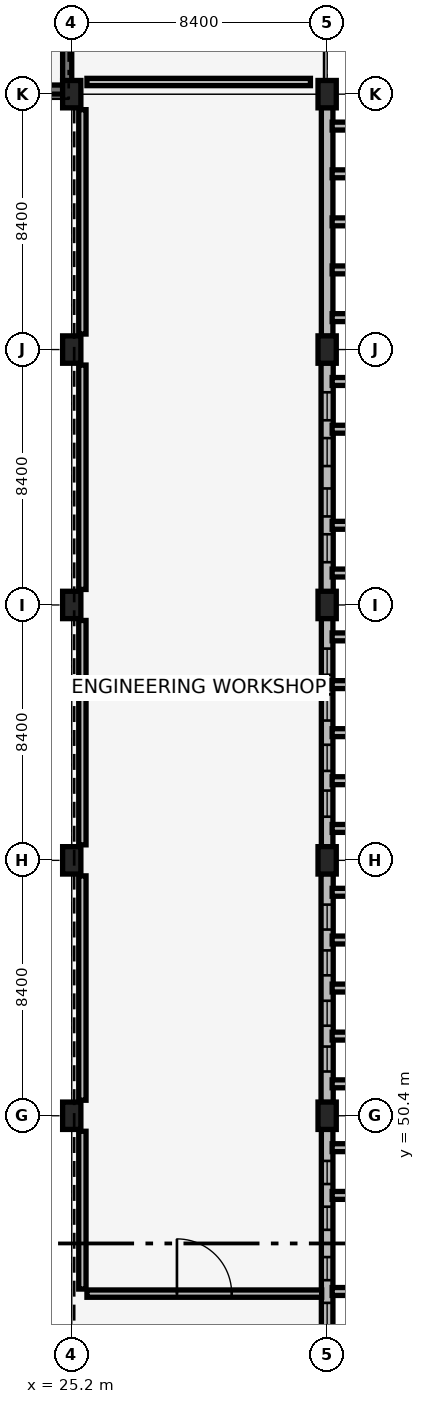
"""IFC4 building model, lengths in metres.
Left out: names, types, materials, properties, quantities, classifications, styles, units other than length and angle.
Written with IfcOpenShell. Run it as: python <this file> out.ifc"""

import sys

from ifc_helpers import new_model, si_unit, direction, frame, frame_2d, origin, origin_2d, place, context, subcontext, project, spatial, rectangle, extrude, element, fill, save


model = new_model("IFC4")
c1 = context("Model", 3, precision=1e-05, world=origin(), true_north=direction((0.0, 1.0)))
c2 = subcontext(c1, "Body", "Model", "MODEL_VIEW")
j1 = project(units=[si_unit("LENGTHUNIT", "METRE"), si_unit("PLANEANGLEUNIT", "RADIAN")], contexts=[c1])
p1 = place(None, origin())
s1 = spatial("IfcSite", under=j1, at=p1, CompositionType="ELEMENT")
p2 = place(p1, origin())
s2 = spatial("IfcBuilding", under=s1, at=p2, CompositionType="ELEMENT")
p3 = place(p2, frame((0.0, 0.0, 5.44)))
s3 = spatial("IfcBuildingStorey", under=s2, at=p3, CompositionType="ELEMENT", Elevation=5.44)
p4 = place(p3, frame((16.95, 84.15, 0.0), z_axis=(0.0, 0.0, 1.0), x_axis=(1.0, 0.0, 0.0)))
e1 = element("IfcWall", 1, at=p4, inside=s3, PredefinedType="SHEAR", context=c2, shape_type="SweptSolid", body=[
    extrude(rectangle(XDim=8.1, YDim=0.3, at=frame_2d((4.05, 0.0))), origin(), (0.0, 0.0, 1.0), 4.12),
])
p5 = place(p3, frame((25.05, 84.15, 0.0), z_axis=(0.0, 0.0, 1.0), x_axis=(0.0, 1.0, 0.0)))
e2 = element("IfcWall", 2, at=p5, inside=s3, PredefinedType="SHEAR", context=c2, shape_type="SweptSolid", body=[
    extrude(rectangle(XDim=8.1, YDim=0.3, at=frame_2d((4.05, 0.0))), origin(), (0.0, 0.0, 1.0), 4.12),
])
p6 = place(p5, frame((1.325, 0.0, 0.0)))
e3 = element("IfcOpeningElement", 3, at=p6, cuts=e2, PredefinedType="OPENING", context=c2, shape_type="SweptSolid", body=[
    extrude(rectangle(XDim=1.45, YDim=2.15, at=frame_2d((0.725, 1.075))), frame((0.0, 0.16, 0.0), z_axis=(0.0, -1.0, 0.0), x_axis=(1.0, 0.0, 0.0)), (0.0, 0.0, 1.0), 0.32),
])
for number, where, z_axis, x_axis in (
    (4, (25.2, 50.4, 0.0), (0.0, 0.0, 1.0), (1.0, 0.0, 0.0)),
    (5, (25.2, 58.8, 0.0), (0.0, 0.0, 1.0), (1.0, 0.0, 0.0)),
    (6, (25.2, 67.2, 0.0), (0.0, 0.0, 1.0), (1.0, 0.0, 0.0)),
    (7, (25.2, 75.6, 0.0), (0.0, 0.0, 1.0), (1.0, 0.0, 0.0)),
    (8, (25.2, 84.0, 0.0), (0.0, 0.0, 1.0), (1.0, 0.0, 0.0)),
    (9, (33.6, 50.4, 0.0), (0.0, 0.0, 1.0), (1.0, 0.0, 0.0)),
    (10, (33.6, 58.8, 0.0), (0.0, 0.0, 1.0), (1.0, 0.0, 0.0)),
    (11, (33.6, 67.2, 0.0), (0.0, 0.0, 1.0), (1.0, 0.0, 0.0)),
    (12, (33.6, 75.6, 0.0), (0.0, 0.0, 1.0), (1.0, 0.0, 0.0)),
    (13, (33.6, 84.0, 0.0), (0.0, 0.0, 1.0), (1.0, 0.0, 0.0)),
):
    element("IfcColumn", number, at=place(p3, frame(where, z_axis=z_axis, x_axis=x_axis)), inside=s3, PredefinedType="COLUMN", context=c2, shape_type="SweptSolid", body=[
        extrude(rectangle(XDim=0.6, YDim=0.9, at=origin_2d()), origin(), (0.0, 0.0, 1.0), 4.12),
    ])
p7 = place(p3, frame((33.6, 42.435, 0.0), z_axis=(0.0, 0.0, 1.0), x_axis=(0.0, 1.0, 0.0)))
e14 = element("IfcWall", 14, at=p7, inside=s3, PredefinedType="SOLIDWALL", context=c2, shape_type="SweptSolid", body=[
    extrude(rectangle(XDim=7.53, YDim=0.38, at=frame_2d((3.765, 0.0))), origin(), (0.0, 0.0, 1.0), 4.02),
])
p8 = place(p7, frame((1.051, 0.0, 0.75)))
e15 = element("IfcOpeningElement", 15, at=p8, cuts=e14, PredefinedType="OPENING", context=c2, shape_type="SweptSolid", body=[
    extrude(rectangle(XDim=0.76, YDim=2.45, at=frame_2d((0.38, 1.225))), frame((0.0, 0.2, 0.0), z_axis=(0.0, -1.0, 0.0), x_axis=(1.0, 0.0, 0.0)), (0.0, 0.0, 1.0), 0.4),
])
p9 = place(p7, frame((2.557, 0.0, 0.75)))
e16 = element("IfcOpeningElement", 16, at=p9, cuts=e14, PredefinedType="OPENING", context=c2, shape_type="SweptSolid", body=[
    extrude(rectangle(XDim=0.76, YDim=2.45, at=frame_2d((0.38, 1.225))), frame((0.0, 0.2, 0.0), z_axis=(0.0, -1.0, 0.0), x_axis=(1.0, 0.0, 0.0)), (0.0, 0.0, 1.0), 0.4),
])
p10 = place(p7, frame((4.213, 0.0, 0.75)))
e17 = element("IfcOpeningElement", 17, at=p10, cuts=e14, PredefinedType="OPENING", context=c2, shape_type="SweptSolid", body=[
    extrude(rectangle(XDim=0.76, YDim=2.45, at=frame_2d((0.38, 1.225))), frame((0.0, 0.2, 0.0), z_axis=(0.0, -1.0, 0.0), x_axis=(1.0, 0.0, 0.0)), (0.0, 0.0, 1.0), 0.4),
])
p11 = place(p7, frame((5.719, 0.0, 0.75)))
e18 = element("IfcOpeningElement", 18, at=p11, cuts=e14, PredefinedType="OPENING", context=c2, shape_type="SweptSolid", body=[
    extrude(rectangle(XDim=0.76, YDim=2.45, at=frame_2d((0.38, 1.225))), frame((0.0, 0.2, 0.0), z_axis=(0.0, -1.0, 0.0), x_axis=(1.0, 0.0, 0.0)), (0.0, 0.0, 1.0), 0.4),
])
for number, where, z_axis, x_axis in (
    (19, (33.765, 44.62, 0.0), (0.0, 0.0, 1.0), (1.0, 0.0, 0.0)),
    (20, (33.765, 47.78, 0.0), (0.0, 0.0, 1.0), (1.0, 0.0, 0.0)),
    (21, (33.765, 49.35, 0.0), (0.0, 0.0, 1.0), (1.0, 0.0, 0.0)),
):
    element("IfcWall", number, at=place(p3, frame(where, z_axis=z_axis, x_axis=x_axis)), inside=s3, PredefinedType="SOLIDWALL", context=c2, shape_type="SweptSolid", body=[
        extrude(rectangle(XDim=0.7, YDim=0.26, at=frame_2d((0.35, 0.0))), origin(), (0.0, 0.0, 1.0), 4.42),
    ])
p12 = place(p3, frame((33.6, 50.835, 0.0), z_axis=(0.0, 0.0, 1.0), x_axis=(0.0, 1.0, 0.0)))
e22 = element("IfcWall", 22, at=p12, inside=s3, PredefinedType="SOLIDWALL", context=c2, shape_type="SweptSolid", body=[
    extrude(rectangle(XDim=7.53, YDim=0.4, at=frame_2d((3.765, 0.0))), origin(), (0.0, 0.0, 1.0), 4.02),
])
p13 = place(p12, frame((1.021, 0.0, 0.75)))
e23 = element("IfcOpeningElement", 23, at=p13, cuts=e22, PredefinedType="OPENING", context=c2, shape_type="SweptSolid", body=[
    extrude(rectangle(XDim=0.82, YDim=2.8, at=frame_2d((0.41, 1.4))), frame((0.0, 0.21, 0.0), z_axis=(0.0, -1.0, 0.0), x_axis=(1.0, 0.0, 0.0)), (0.0, 0.0, 1.0), 0.42),
])
p14 = place(p12, frame((2.527, 0.0, 0.75)))
e24 = element("IfcOpeningElement", 24, at=p14, cuts=e22, PredefinedType="OPENING", context=c2, shape_type="SweptSolid", body=[
    extrude(rectangle(XDim=0.82, YDim=2.8, at=frame_2d((0.41, 1.4))), frame((0.0, 0.21, 0.0), z_axis=(0.0, -1.0, 0.0), x_axis=(1.0, 0.0, 0.0)), (0.0, 0.0, 1.0), 0.42),
])
p15 = place(p12, frame((4.183, 0.0, 0.75)))
e25 = element("IfcOpeningElement", 25, at=p15, cuts=e22, PredefinedType="OPENING", context=c2, shape_type="SweptSolid", body=[
    extrude(rectangle(XDim=0.82, YDim=2.8, at=frame_2d((0.41, 1.4))), frame((0.0, 0.21, 0.0), z_axis=(0.0, -1.0, 0.0), x_axis=(1.0, 0.0, 0.0)), (0.0, 0.0, 1.0), 0.42),
])
p16 = place(p12, frame((5.689, 0.0, 0.75)))
e26 = element("IfcOpeningElement", 26, at=p16, cuts=e22, PredefinedType="OPENING", context=c2, shape_type="SweptSolid", body=[
    extrude(rectangle(XDim=0.82, YDim=2.8, at=frame_2d((0.41, 1.4))), frame((0.0, 0.21, 0.0), z_axis=(0.0, -1.0, 0.0), x_axis=(1.0, 0.0, 0.0)), (0.0, 0.0, 1.0), 0.42),
])
for number, where, z_axis, x_axis in (
    (27, (33.765, 51.45, 0.0), (0.0, 0.0, 1.0), (1.0, 0.0, 0.0)),
    (28, (33.765, 53.02, 0.0), (0.0, 0.0, 1.0), (1.0, 0.0, 0.0)),
    (29, (33.765, 54.6, 0.0), (0.0, 0.0, 1.0), (1.0, 0.0, 0.0)),
    (30, (33.765, 56.18, 0.0), (0.0, 0.0, 1.0), (1.0, 0.0, 0.0)),
    (31, (33.765, 57.75, 0.0), (0.0, 0.0, 1.0), (1.0, 0.0, 0.0)),
):
    element("IfcWall", number, at=place(p3, frame(where, z_axis=z_axis, x_axis=x_axis)), inside=s3, PredefinedType="SOLIDWALL", context=c2, shape_type="SweptSolid", body=[
        extrude(rectangle(XDim=0.7, YDim=0.26, at=frame_2d((0.35, 0.0))), origin(), (0.0, 0.0, 1.0), 4.42),
    ])
p17 = place(p3, frame((33.6, 59.235, 0.0), z_axis=(0.0, 0.0, 1.0), x_axis=(0.0, 1.0, 0.0)))
e32 = element("IfcWall", 32, at=p17, inside=s3, PredefinedType="SOLIDWALL", context=c2, shape_type="SweptSolid", body=[
    extrude(rectangle(XDim=7.53, YDim=0.38, at=frame_2d((3.765, 0.0))), origin(), (0.0, 0.0, 1.0), 4.02),
])
p18 = place(p17, frame((1.001, 0.0, 0.75)))
e33 = element("IfcOpeningElement", 33, at=p18, cuts=e32, PredefinedType="OPENING", context=c2, shape_type="SweptSolid", body=[
    extrude(rectangle(XDim=0.86, YDim=2.6, at=frame_2d((0.43, 1.3))), frame((0.0, 0.2, 0.0), z_axis=(0.0, -1.0, 0.0), x_axis=(1.0, 0.0, 0.0)), (0.0, 0.0, 1.0), 0.4),
])
p19 = place(p17, frame((2.507, 0.0, 0.75)))
e34 = element("IfcOpeningElement", 34, at=p19, cuts=e32, PredefinedType="OPENING", context=c2, shape_type="SweptSolid", body=[
    extrude(rectangle(XDim=0.86, YDim=2.6, at=frame_2d((0.43, 1.3))), frame((0.0, 0.2, 0.0), z_axis=(0.0, -1.0, 0.0), x_axis=(1.0, 0.0, 0.0)), (0.0, 0.0, 1.0), 0.4),
])
p20 = place(p17, frame((4.163, 0.0, 0.75)))
e35 = element("IfcOpeningElement", 35, at=p20, cuts=e32, PredefinedType="OPENING", context=c2, shape_type="SweptSolid", body=[
    extrude(rectangle(XDim=0.86, YDim=2.6, at=frame_2d((0.43, 1.3))), frame((0.0, 0.2, 0.0), z_axis=(0.0, -1.0, 0.0), x_axis=(1.0, 0.0, 0.0)), (0.0, 0.0, 1.0), 0.4),
])
p21 = place(p17, frame((5.669, 0.0, 0.75)))
e36 = element("IfcOpeningElement", 36, at=p21, cuts=e32, PredefinedType="OPENING", context=c2, shape_type="SweptSolid", body=[
    extrude(rectangle(XDim=0.86, YDim=2.6, at=frame_2d((0.43, 1.3))), frame((0.0, 0.2, 0.0), z_axis=(0.0, -1.0, 0.0), x_axis=(1.0, 0.0, 0.0)), (0.0, 0.0, 1.0), 0.4),
])
for number, where, z_axis, x_axis in (
    (37, (33.765, 59.85, 0.0), (0.0, 0.0, 1.0), (1.0, 0.0, 0.0)),
    (38, (33.765, 61.42, 0.0), (0.0, 0.0, 1.0), (1.0, 0.0, 0.0)),
    (39, (33.765, 63.0, 0.0), (0.0, 0.0, 1.0), (1.0, 0.0, 0.0)),
    (40, (33.765, 64.58, 0.0), (0.0, 0.0, 1.0), (1.0, 0.0, 0.0)),
    (41, (33.765, 66.15, 0.0), (0.0, 0.0, 1.0), (1.0, 0.0, 0.0)),
):
    element("IfcWall", number, at=place(p3, frame(where, z_axis=z_axis, x_axis=x_axis)), inside=s3, PredefinedType="SOLIDWALL", context=c2, shape_type="SweptSolid", body=[
        extrude(rectangle(XDim=0.7, YDim=0.26, at=frame_2d((0.35, 0.0))), origin(), (0.0, 0.0, 1.0), 4.42),
    ])
p22 = place(p3, frame((33.6, 67.635, 0.0), z_axis=(0.0, 0.0, 1.0), x_axis=(0.0, 1.0, 0.0)))
e42 = element("IfcWall", 42, at=p22, inside=s3, PredefinedType="SOLIDWALL", context=c2, shape_type="SweptSolid", body=[
    extrude(rectangle(XDim=7.53, YDim=0.4, at=frame_2d((3.765, 0.0))), origin(), (0.0, 0.0, 1.0), 4.02),
])
p23 = place(p22, frame((0.971, 0.0, 0.75)))
e43 = element("IfcOpeningElement", 43, at=p23, cuts=e42, PredefinedType="OPENING", context=c2, shape_type="SweptSolid", body=[
    extrude(rectangle(XDim=0.92, YDim=2.85, at=frame_2d((0.46, 1.425))), frame((0.0, 0.21, 0.0), z_axis=(0.0, -1.0, 0.0), x_axis=(1.0, 0.0, 0.0)), (0.0, 0.0, 1.0), 0.42),
])
p24 = place(p22, frame((2.477, 0.0, 0.75)))
e44 = element("IfcOpeningElement", 44, at=p24, cuts=e42, PredefinedType="OPENING", context=c2, shape_type="SweptSolid", body=[
    extrude(rectangle(XDim=0.92, YDim=2.85, at=frame_2d((0.46, 1.425))), frame((0.0, 0.21, 0.0), z_axis=(0.0, -1.0, 0.0), x_axis=(1.0, 0.0, 0.0)), (0.0, 0.0, 1.0), 0.42),
])
p25 = place(p22, frame((4.133, 0.0, 0.75)))
e45 = element("IfcOpeningElement", 45, at=p25, cuts=e42, PredefinedType="OPENING", context=c2, shape_type="SweptSolid", body=[
    extrude(rectangle(XDim=0.92, YDim=2.85, at=frame_2d((0.46, 1.425))), frame((0.0, 0.21, 0.0), z_axis=(0.0, -1.0, 0.0), x_axis=(1.0, 0.0, 0.0)), (0.0, 0.0, 1.0), 0.42),
])
p26 = place(p22, frame((5.639, 0.0, 0.75)))
e46 = element("IfcOpeningElement", 46, at=p26, cuts=e42, PredefinedType="OPENING", context=c2, shape_type="SweptSolid", body=[
    extrude(rectangle(XDim=0.92, YDim=2.85, at=frame_2d((0.46, 1.425))), frame((0.0, 0.21, 0.0), z_axis=(0.0, -1.0, 0.0), x_axis=(1.0, 0.0, 0.0)), (0.0, 0.0, 1.0), 0.42),
])
for number, where, z_axis, x_axis in (
    (47, (33.765, 68.25, 0.0), (0.0, 0.0, 1.0), (1.0, 0.0, 0.0)),
    (48, (33.765, 69.82, 0.0), (0.0, 0.0, 1.0), (1.0, 0.0, 0.0)),
    (49, (33.765, 72.98, 0.0), (0.0, 0.0, 1.0), (1.0, 0.0, 0.0)),
    (50, (33.765, 74.55, 0.0), (0.0, 0.0, 1.0), (1.0, 0.0, 0.0)),
):
    element("IfcWall", number, at=place(p3, frame(where, z_axis=z_axis, x_axis=x_axis)), inside=s3, PredefinedType="SOLIDWALL", context=c2, shape_type="SweptSolid", body=[
        extrude(rectangle(XDim=0.7, YDim=0.26, at=frame_2d((0.35, 0.0))), origin(), (0.0, 0.0, 1.0), 4.42),
    ])
p27 = place(p3, frame((33.6, 76.035, 0.0), z_axis=(0.0, 0.0, 1.0), x_axis=(0.0, 1.0, 0.0)))
e51 = element("IfcWall", 51, at=p27, inside=s3, PredefinedType="SOLIDWALL", context=c2, shape_type="SweptSolid", body=[
    extrude(rectangle(XDim=7.53, YDim=0.38, at=frame_2d((3.765, 0.0))), origin(), (0.0, 0.0, 1.0), 4.02),
])
for number, where, z_axis, x_axis in (
    (52, (33.765, 76.65, 0.0), (0.0, 0.0, 1.0), (1.0, 0.0, 0.0)),
    (53, (33.765, 78.22, 0.0), (0.0, 0.0, 1.0), (1.0, 0.0, 0.0)),
    (54, (33.765, 79.8, 0.0), (0.0, 0.0, 1.0), (1.0, 0.0, 0.0)),
    (55, (33.765, 81.38, 0.0), (0.0, 0.0, 1.0), (1.0, 0.0, 0.0)),
    (56, (33.765, 82.95, 0.0), (0.0, 0.0, 1.0), (1.0, 0.0, 0.0)),
):
    element("IfcWall", number, at=place(p3, frame(where, z_axis=z_axis, x_axis=x_axis)), inside=s3, PredefinedType="SOLIDWALL", context=c2, shape_type="SweptSolid", body=[
        extrude(rectangle(XDim=0.7, YDim=0.26, at=frame_2d((0.35, 0.0))), origin(), (0.0, 0.0, 1.0), 4.42),
    ])
p28 = place(p3, frame((25.7, 44.55, 0.0), z_axis=(0.0, 0.0, 1.0), x_axis=(1.0, 0.0, 0.0)))
e57 = element("IfcWall", 57, at=p28, inside=s3, PredefinedType="PARTITIONING", context=c2, shape_type="SweptSolid", body=[
    extrude(rectangle(XDim=7.72, YDim=0.24, at=frame_2d((3.86, 0.0))), origin(), (0.0, 0.0, 1.0), 4.02),
])
p29 = place(p28, frame((2.96, 0.0, 0.0)))
e58 = element("IfcOpeningElement", 58, at=p29, cuts=e57, PredefinedType="OPENING", context=c2, shape_type="SweptSolid", body=[
    extrude(rectangle(XDim=1.8, YDim=2.4, at=frame_2d((0.9, 1.2))), frame((0.0, 0.13, 0.0), z_axis=(0.0, -1.0, 0.0), x_axis=(1.0, 0.0, 0.0)), (0.0, 0.0, 1.0), 0.26),
])
p30 = place(p3, frame((25.7, 84.4, 0.0), z_axis=(0.0, 0.0, 1.0), x_axis=(1.0, 0.0, 0.0)))
e59 = element("IfcWall", 59, at=p30, inside=s3, PredefinedType="PARTITIONING", context=c2, shape_type="SweptSolid", body=[
    extrude(rectangle(XDim=7.35, YDim=0.24, at=frame_2d((3.675, 0.0))), origin(), (0.0, 0.0, 1.0), 4.12),
])
p31 = place(p3, frame((25.55, 44.7, 0.0), z_axis=(0.0, 0.0, 1.0), x_axis=(0.0, 1.0, 0.0)))
e60 = element("IfcWall", 60, at=p31, inside=s3, PredefinedType="PARTITIONING", context=c2, shape_type="SweptSolid", body=[
    extrude(rectangle(XDim=5.19, YDim=0.24, at=frame_2d((2.595, 0.0))), origin(), (0.0, 0.0, 1.0), 4.12),
])
p32 = place(p3, frame((25.55, 50.91, 0.0), z_axis=(0.0, 0.0, 1.0), x_axis=(0.0, 1.0, 0.0)))
e61 = element("IfcWall", 61, at=p32, inside=s3, PredefinedType="PARTITIONING", context=c2, shape_type="SweptSolid", body=[
    extrude(rectangle(XDim=7.38, YDim=0.24, at=frame_2d((3.69, 0.0))), origin(), (0.0, 0.0, 1.0), 4.12),
])
p33 = place(p3, frame((25.55, 59.31, 0.0), z_axis=(0.0, 0.0, 1.0), x_axis=(0.0, 1.0, 0.0)))
e62 = element("IfcWall", 62, at=p33, inside=s3, PredefinedType="PARTITIONING", context=c2, shape_type="SweptSolid", body=[
    extrude(rectangle(XDim=7.38, YDim=0.24, at=frame_2d((3.69, 0.0))), origin(), (0.0, 0.0, 1.0), 4.12),
])
p34 = place(p3, frame((25.55, 67.71, 0.0), z_axis=(0.0, 0.0, 1.0), x_axis=(0.0, 1.0, 0.0)))
e63 = element("IfcWall", 63, at=p34, inside=s3, PredefinedType="PARTITIONING", context=c2, shape_type="SweptSolid", body=[
    extrude(rectangle(XDim=7.38, YDim=0.24, at=frame_2d((3.69, 0.0))), origin(), (0.0, 0.0, 1.0), 4.12),
])
p35 = place(p3, frame((25.55, 76.11, 0.0), z_axis=(0.0, 0.0, 1.0), x_axis=(0.0, 1.0, 0.0)))
e64 = element("IfcWall", 64, at=p35, inside=s3, PredefinedType="PARTITIONING", context=c2, shape_type="SweptSolid", body=[
    extrude(rectangle(XDim=7.38, YDim=0.24, at=frame_2d((3.69, 0.0))), origin(), (0.0, 0.0, 1.0), 4.12),
])
p36 = place(p8, origin())
e65 = element("IfcWindow", 65, at=p36, inside=s3, PartitioningType="DOUBLE_PANEL_VERTICAL", PredefinedType="WINDOW", context=c2, shape_type="SweptSolid", body=[
    extrude(rectangle(XDim=0.76, YDim=2.45, at=frame_2d((0.38, 1.225))), frame((0.0, 0.03, 0.0), z_axis=(0.0, -1.0, 0.0), x_axis=(1.0, 0.0, 0.0)), (0.0, 0.0, 1.0), 0.06),
])
fill(e15, e65)
p37 = place(p9, origin())
e66 = element("IfcWindow", 66, at=p37, inside=s3, PartitioningType="DOUBLE_PANEL_VERTICAL", PredefinedType="WINDOW", context=c2, shape_type="SweptSolid", body=[
    extrude(rectangle(XDim=0.76, YDim=2.45, at=frame_2d((0.38, 1.225))), frame((0.0, 0.03, 0.0), z_axis=(0.0, -1.0, 0.0), x_axis=(1.0, 0.0, 0.0)), (0.0, 0.0, 1.0), 0.06),
])
fill(e16, e66)
p38 = place(p10, origin())
e67 = element("IfcWindow", 67, at=p38, inside=s3, PartitioningType="DOUBLE_PANEL_VERTICAL", PredefinedType="WINDOW", context=c2, shape_type="SweptSolid", body=[
    extrude(rectangle(XDim=0.76, YDim=2.45, at=frame_2d((0.38, 1.225))), frame((0.0, 0.03, 0.0), z_axis=(0.0, -1.0, 0.0), x_axis=(1.0, 0.0, 0.0)), (0.0, 0.0, 1.0), 0.06),
])
fill(e17, e67)
p39 = place(p11, origin())
e68 = element("IfcWindow", 68, at=p39, inside=s3, PartitioningType="DOUBLE_PANEL_VERTICAL", PredefinedType="WINDOW", context=c2, shape_type="SweptSolid", body=[
    extrude(rectangle(XDim=0.76, YDim=2.45, at=frame_2d((0.38, 1.225))), frame((0.0, 0.03, 0.0), z_axis=(0.0, -1.0, 0.0), x_axis=(1.0, 0.0, 0.0)), (0.0, 0.0, 1.0), 0.06),
])
fill(e18, e68)
p40 = place(p13, origin())
e69 = element("IfcWindow", 69, at=p40, inside=s3, PartitioningType="DOUBLE_PANEL_VERTICAL", PredefinedType="WINDOW", context=c2, shape_type="SweptSolid", body=[
    extrude(rectangle(XDim=0.82, YDim=2.8, at=frame_2d((0.41, 1.4))), frame((0.0, 0.03, 0.0), z_axis=(0.0, -1.0, 0.0), x_axis=(1.0, 0.0, 0.0)), (0.0, 0.0, 1.0), 0.06),
])
fill(e23, e69)
p41 = place(p14, origin())
e70 = element("IfcWindow", 70, at=p41, inside=s3, PartitioningType="DOUBLE_PANEL_VERTICAL", PredefinedType="WINDOW", context=c2, shape_type="SweptSolid", body=[
    extrude(rectangle(XDim=0.82, YDim=2.8, at=frame_2d((0.41, 1.4))), frame((0.0, 0.03, 0.0), z_axis=(0.0, -1.0, 0.0), x_axis=(1.0, 0.0, 0.0)), (0.0, 0.0, 1.0), 0.06),
])
fill(e24, e70)
p42 = place(p15, origin())
e71 = element("IfcWindow", 71, at=p42, inside=s3, PartitioningType="DOUBLE_PANEL_VERTICAL", PredefinedType="WINDOW", context=c2, shape_type="SweptSolid", body=[
    extrude(rectangle(XDim=0.82, YDim=2.8, at=frame_2d((0.41, 1.4))), frame((0.0, 0.03, 0.0), z_axis=(0.0, -1.0, 0.0), x_axis=(1.0, 0.0, 0.0)), (0.0, 0.0, 1.0), 0.06),
])
fill(e25, e71)
p43 = place(p16, origin())
e72 = element("IfcWindow", 72, at=p43, inside=s3, PartitioningType="DOUBLE_PANEL_VERTICAL", PredefinedType="WINDOW", context=c2, shape_type="SweptSolid", body=[
    extrude(rectangle(XDim=0.82, YDim=2.8, at=frame_2d((0.41, 1.4))), frame((0.0, 0.03, 0.0), z_axis=(0.0, -1.0, 0.0), x_axis=(1.0, 0.0, 0.0)), (0.0, 0.0, 1.0), 0.06),
])
fill(e26, e72)
p44 = place(p18, origin())
e73 = element("IfcWindow", 73, at=p44, inside=s3, PartitioningType="DOUBLE_PANEL_VERTICAL", PredefinedType="WINDOW", context=c2, shape_type="SweptSolid", body=[
    extrude(rectangle(XDim=0.86, YDim=2.6, at=frame_2d((0.43, 1.3))), frame((0.0, 0.03, 0.0), z_axis=(0.0, -1.0, 0.0), x_axis=(1.0, 0.0, 0.0)), (0.0, 0.0, 1.0), 0.06),
])
fill(e33, e73)
p45 = place(p19, origin())
e74 = element("IfcWindow", 74, at=p45, inside=s3, PartitioningType="DOUBLE_PANEL_VERTICAL", PredefinedType="WINDOW", context=c2, shape_type="SweptSolid", body=[
    extrude(rectangle(XDim=0.86, YDim=2.6, at=frame_2d((0.43, 1.3))), frame((0.0, 0.03, 0.0), z_axis=(0.0, -1.0, 0.0), x_axis=(1.0, 0.0, 0.0)), (0.0, 0.0, 1.0), 0.06),
])
fill(e34, e74)
p46 = place(p20, origin())
e75 = element("IfcWindow", 75, at=p46, inside=s3, PartitioningType="DOUBLE_PANEL_VERTICAL", PredefinedType="WINDOW", context=c2, shape_type="SweptSolid", body=[
    extrude(rectangle(XDim=0.86, YDim=2.6, at=frame_2d((0.43, 1.3))), frame((0.0, 0.03, 0.0), z_axis=(0.0, -1.0, 0.0), x_axis=(1.0, 0.0, 0.0)), (0.0, 0.0, 1.0), 0.06),
])
fill(e35, e75)
p47 = place(p21, origin())
e76 = element("IfcWindow", 76, at=p47, inside=s3, PartitioningType="DOUBLE_PANEL_VERTICAL", PredefinedType="WINDOW", context=c2, shape_type="SweptSolid", body=[
    extrude(rectangle(XDim=0.86, YDim=2.6, at=frame_2d((0.43, 1.3))), frame((0.0, 0.03, 0.0), z_axis=(0.0, -1.0, 0.0), x_axis=(1.0, 0.0, 0.0)), (0.0, 0.0, 1.0), 0.06),
])
fill(e36, e76)
p48 = place(p23, origin())
e77 = element("IfcWindow", 77, at=p48, inside=s3, PartitioningType="DOUBLE_PANEL_VERTICAL", PredefinedType="WINDOW", context=c2, shape_type="SweptSolid", body=[
    extrude(rectangle(XDim=0.92, YDim=2.85, at=frame_2d((0.46, 1.425))), frame((0.0, 0.03, 0.0), z_axis=(0.0, -1.0, 0.0), x_axis=(1.0, 0.0, 0.0)), (0.0, 0.0, 1.0), 0.06),
])
fill(e43, e77)
p49 = place(p24, origin())
e78 = element("IfcWindow", 78, at=p49, inside=s3, PartitioningType="DOUBLE_PANEL_VERTICAL", PredefinedType="WINDOW", context=c2, shape_type="SweptSolid", body=[
    extrude(rectangle(XDim=0.92, YDim=2.85, at=frame_2d((0.46, 1.425))), frame((0.0, 0.03, 0.0), z_axis=(0.0, -1.0, 0.0), x_axis=(1.0, 0.0, 0.0)), (0.0, 0.0, 1.0), 0.06),
])
fill(e44, e78)
p50 = place(p25, origin())
e79 = element("IfcWindow", 79, at=p50, inside=s3, PartitioningType="DOUBLE_PANEL_VERTICAL", PredefinedType="WINDOW", context=c2, shape_type="SweptSolid", body=[
    extrude(rectangle(XDim=0.92, YDim=2.85, at=frame_2d((0.46, 1.425))), frame((0.0, 0.03, 0.0), z_axis=(0.0, -1.0, 0.0), x_axis=(1.0, 0.0, 0.0)), (0.0, 0.0, 1.0), 0.06),
])
fill(e45, e79)
p51 = place(p26, origin())
e80 = element("IfcWindow", 80, at=p51, inside=s3, PartitioningType="DOUBLE_PANEL_VERTICAL", PredefinedType="WINDOW", context=c2, shape_type="SweptSolid", body=[
    extrude(rectangle(XDim=0.92, YDim=2.85, at=frame_2d((0.46, 1.425))), frame((0.0, 0.03, 0.0), z_axis=(0.0, -1.0, 0.0), x_axis=(1.0, 0.0, 0.0)), (0.0, 0.0, 1.0), 0.06),
])
fill(e46, e80)
p52 = place(p29, origin())
e81 = element("IfcDoor", 81, at=p52, inside=s3, OperationType="DOUBLE_DOOR_SINGLE_SWING", PredefinedType="DOOR", context=c2, shape_type="SweptSolid", body=[
    extrude(rectangle(XDim=1.8, YDim=2.4, at=frame_2d((0.9, 1.2))), frame((0.0, 0.025, 0.0), z_axis=(0.0, -1.0, 0.0), x_axis=(1.0, 0.0, 0.0)), (0.0, 0.0, 1.0), 0.05),
])
fill(e58, e81)
save(model, sys.argv[1])
